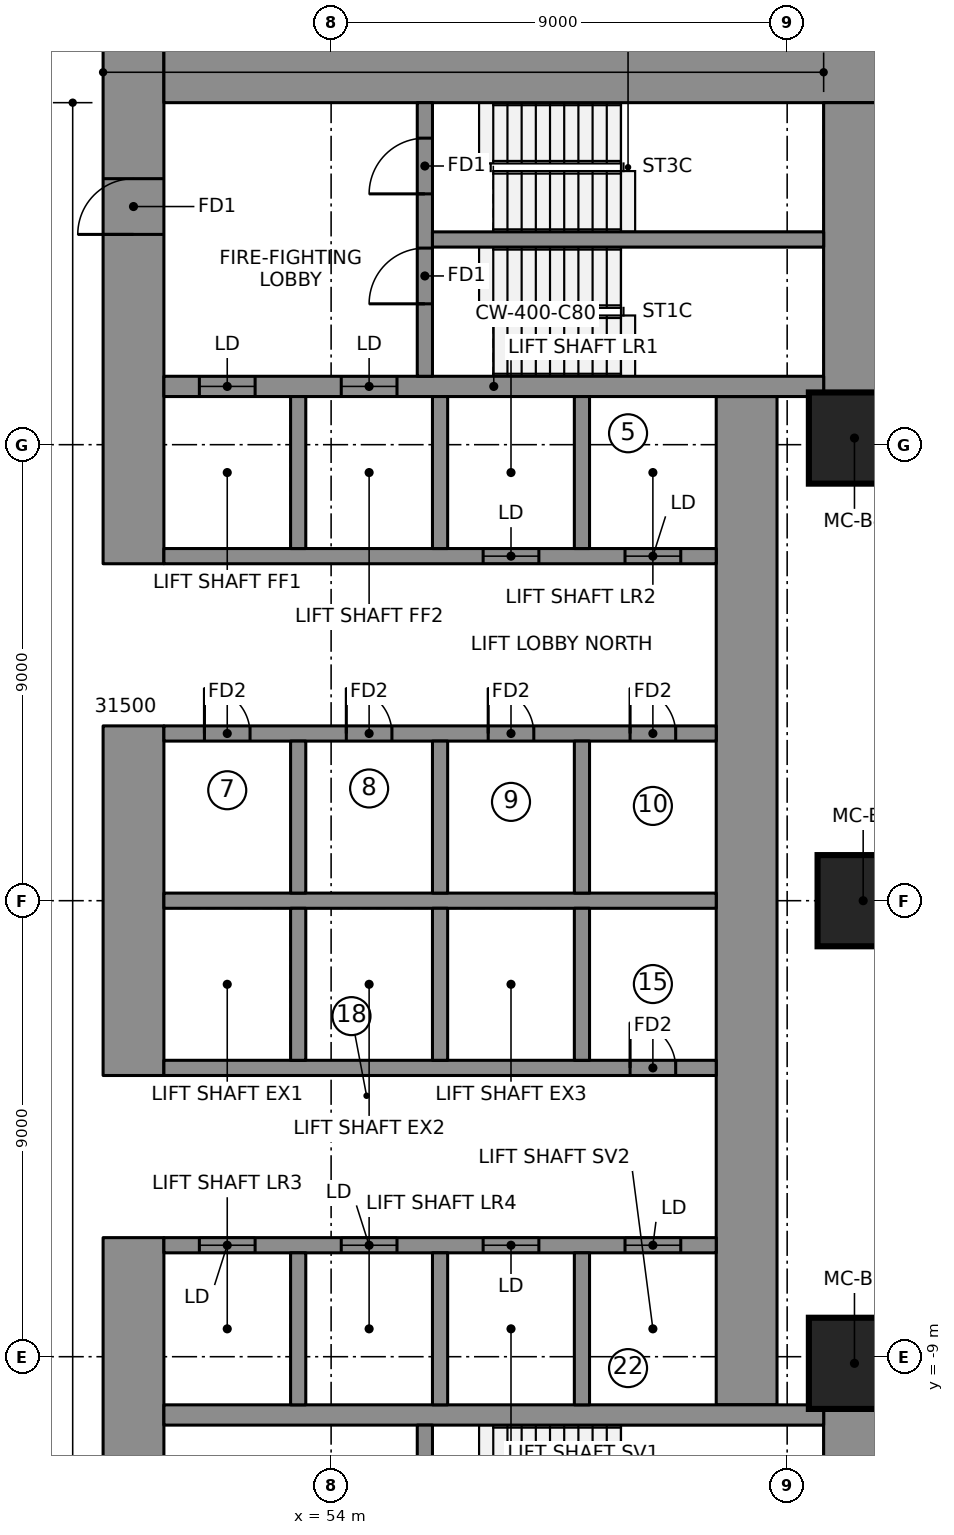
"""IFC4 building model, lengths in metres.
Left out: names, types, materials, properties, quantities, classifications, styles, units other than length and angle.
Written with IfcOpenShell. Run it as: python <this file> out.ifc"""

import sys

from ifc_helpers import new_model, si_unit, direction, frame, frame_2d, origin, origin_2d, place, context, subcontext, project, spatial, rectangle, extrude, element, fill, save


model = new_model("IFC4")
c1 = context("Model", 3, precision=1e-05, world=origin(), true_north=direction((0.0, 1.0)))
c2 = subcontext(c1, "Body", "Model", "MODEL_VIEW")
j1 = project(units=[si_unit("LENGTHUNIT", "METRE"), si_unit("PLANEANGLEUNIT", "RADIAN")], contexts=[c1])
p1 = place(None, origin())
s1 = spatial("IfcSite", under=j1, at=p1, CompositionType="ELEMENT")
p2 = place(p1, origin())
s2 = spatial("IfcBuilding", under=s1, at=p2, CompositionType="ELEMENT")
p3 = place(p2, frame((0.0, 0.0, 46.7)))
s3 = spatial("IfcBuildingStorey", under=s2, at=p3, CompositionType="ELEMENT", Elevation=46.7)
p4 = place(p3, frame((50.1, 6.65, 0.0), z_axis=(0.0, 0.0, 1.0), x_axis=(0.0, 1.0, 0.0)))
e1 = element("IfcWall", 1, at=p4, inside=s3, PredefinedType="SHEAR", context=c2, shape_type="SweptSolid", body=[
    extrude(rectangle(XDim=10.3, YDim=1.2, at=frame_2d((5.15, 0.0))), origin(), (0.0, 0.0, 1.0), 3.55),
])
p5 = place(p4, frame((6.5, 0.0, 0.0)))
e2 = element("IfcOpeningElement", 2, at=p5, cuts=e1, PredefinedType="OPENING", context=c2, shape_type="SweptSolid", body=[
    extrude(rectangle(XDim=1.1, YDim=2.1, at=frame_2d((0.55, 1.05))), frame((0.0, 0.61, 0.0), z_axis=(0.0, -1.0, 0.0), x_axis=(1.0, 0.0, 0.0)), (0.0, 0.0, 1.0), 1.22),
])
p6 = place(p3, frame((50.1, -3.45, 0.0), z_axis=(0.0, 0.0, 1.0), x_axis=(0.0, 1.0, 0.0)))
e3 = element("IfcWall", 3, at=p6, inside=s3, PredefinedType="SHEAR", context=c2, shape_type="SweptSolid", body=[
    extrude(rectangle(XDim=6.9, YDim=1.2, at=frame_2d((3.45, 0.0))), origin(), (0.0, 0.0, 1.0), 3.55),
])
p7 = place(p3, frame((50.1, -16.95, 0.0), z_axis=(0.0, 0.0, 1.0), x_axis=(0.0, 1.0, 0.0)))
e4 = element("IfcWall", 4, at=p7, inside=s3, PredefinedType="SHEAR", context=c2, shape_type="SweptSolid", body=[
    extrude(rectangle(XDim=10.3, YDim=1.2, at=frame_2d((5.15, 0.0))), origin(), (0.0, 0.0, 1.0), 3.55),
])
p8 = place(p7, frame((2.7, 0.0, 0.0)))
e5 = element("IfcOpeningElement", 5, at=p8, cuts=e4, PredefinedType="OPENING", context=c2, shape_type="SweptSolid", body=[
    extrude(rectangle(XDim=1.1, YDim=2.1, at=frame_2d((0.55, 1.05))), frame((0.0, 0.61, 0.0), z_axis=(0.0, -1.0, 0.0), x_axis=(1.0, 0.0, 0.0)), (0.0, 0.0, 1.0), 1.22),
])
p9 = place(p3, frame((50.7, 16.35, 0.0), z_axis=(0.0, 0.0, 1.0), x_axis=(1.0, 0.0, 0.0)))
e6 = element("IfcWall", 6, at=p9, inside=s3, PredefinedType="SHEAR", context=c2, shape_type="SweptSolid", body=[
    extrude(rectangle(XDim=14.22, YDim=1.2, at=frame_2d((7.11, 0.0))), origin(), (0.0, 0.0, 1.0), 3.55),
])
for number, where, z_axis, x_axis in (
    (7, (64.32, 9.95, 0.0), (0.0, 0.0, 1.0), (0.0, 1.0, 0.0)),
    (8, (64.32, -15.75, 0.0), (0.0, 0.0, 1.0), (0.0, 1.0, 0.0)),
):
    element("IfcWall", number, at=place(p3, frame(where, z_axis=z_axis, x_axis=x_axis)), inside=s3, PredefinedType="SHEAR", context=c2, shape_type="SweptSolid", body=[
        extrude(rectangle(XDim=5.8, YDim=1.2, at=frame_2d((2.9, 0.0))), origin(), (0.0, 0.0, 1.0), 3.55),
    ])
p10 = place(p3, frame((62.2, -9.95, 0.0), z_axis=(0.0, 0.0, 1.0), x_axis=(0.0, 1.0, 0.0)))
e9 = element("IfcWall", 9, at=p10, inside=s3, PredefinedType="SHEAR", context=c2, shape_type="SweptSolid", body=[
    extrude(rectangle(XDim=19.9, YDim=1.2, at=frame_2d((9.95, 0.0))), origin(), (0.0, 0.0, 1.0), 3.55),
])
p11 = place(p3, frame((50.7, 10.15, 0.0), z_axis=(0.0, 0.0, 1.0), x_axis=(1.0, 0.0, 0.0)))
e10 = element("IfcWall", 10, at=p11, inside=s3, PredefinedType="SHEAR", context=c2, shape_type="SweptSolid", body=[
    extrude(rectangle(XDim=13.02, YDim=0.4, at=frame_2d((6.51, 0.0))), origin(), (0.0, 0.0, 1.0), 3.55),
])
p12 = place(p11, frame((0.7, 0.0, 0.0)))
e11 = element("IfcOpeningElement", 11, at=p12, cuts=e10, PredefinedType="OPENING", context=c2, shape_type="SweptSolid", body=[
    extrude(rectangle(XDim=1.1, YDim=2.1, at=frame_2d((0.55, 1.05))), frame((0.0, 0.21, 0.0), z_axis=(0.0, -1.0, 0.0), x_axis=(1.0, 0.0, 0.0)), (0.0, 0.0, 1.0), 0.42),
])
p13 = place(p11, frame((3.5, 0.0, 0.0)))
e12 = element("IfcOpeningElement", 12, at=p13, cuts=e10, PredefinedType="OPENING", context=c2, shape_type="SweptSolid", body=[
    extrude(rectangle(XDim=1.1, YDim=2.1, at=frame_2d((0.55, 1.05))), frame((0.0, 0.21, 0.0), z_axis=(0.0, -1.0, 0.0), x_axis=(1.0, 0.0, 0.0)), (0.0, 0.0, 1.0), 0.42),
])
p14 = place(p3, frame((50.7, -10.15, 0.0), z_axis=(0.0, 0.0, 1.0), x_axis=(1.0, 0.0, 0.0)))
e13 = element("IfcWall", 13, at=p14, inside=s3, PredefinedType="SHEAR", context=c2, shape_type="SweptSolid", body=[
    extrude(rectangle(XDim=13.02, YDim=0.4, at=frame_2d((6.51, 0.0))), origin(), (0.0, 0.0, 1.0), 3.55),
])
p15 = place(p3, frame((50.7, 0.0, 0.0), z_axis=(0.0, 0.0, 1.0), x_axis=(1.0, 0.0, 0.0)))
e14 = element("IfcWall", 14, at=p15, inside=s3, PredefinedType="SHEAR", context=c2, shape_type="SweptSolid", body=[
    extrude(rectangle(XDim=10.9, YDim=0.3, at=frame_2d((5.45, 0.0))), origin(), (0.0, 0.0, 1.0), 3.55),
])
p16 = place(p3, frame((50.7, 3.3, 0.0), z_axis=(0.0, 0.0, 1.0), x_axis=(1.0, 0.0, 0.0)))
e15 = element("IfcWall", 15, at=p16, inside=s3, PredefinedType="SHEAR", context=c2, shape_type="SweptSolid", body=[
    extrude(rectangle(XDim=10.9, YDim=0.3, at=frame_2d((5.45, 0.0))), origin(), (0.0, 0.0, 1.0), 3.55),
])
p17 = place(p16, frame((0.8, 0.0, 0.0)))
e16 = element("IfcOpeningElement", 16, at=p17, cuts=e15, PredefinedType="OPENING", context=c2, shape_type="SweptSolid", body=[
    extrude(rectangle(XDim=0.9, YDim=2.1, at=frame_2d((0.45, 1.05))), frame((0.0, 0.16, 0.0), z_axis=(0.0, -1.0, 0.0), x_axis=(1.0, 0.0, 0.0)), (0.0, 0.0, 1.0), 0.32),
])
p18 = place(p16, frame((3.6, 0.0, 0.0)))
e17 = element("IfcOpeningElement", 17, at=p18, cuts=e15, PredefinedType="OPENING", context=c2, shape_type="SweptSolid", body=[
    extrude(rectangle(XDim=0.9, YDim=2.1, at=frame_2d((0.45, 1.05))), frame((0.0, 0.16, 0.0), z_axis=(0.0, -1.0, 0.0), x_axis=(1.0, 0.0, 0.0)), (0.0, 0.0, 1.0), 0.32),
])
p19 = place(p16, frame((6.4, 0.0, 0.0)))
e18 = element("IfcOpeningElement", 18, at=p19, cuts=e15, PredefinedType="OPENING", context=c2, shape_type="SweptSolid", body=[
    extrude(rectangle(XDim=0.9, YDim=2.1, at=frame_2d((0.45, 1.05))), frame((0.0, 0.16, 0.0), z_axis=(0.0, -1.0, 0.0), x_axis=(1.0, 0.0, 0.0)), (0.0, 0.0, 1.0), 0.32),
])
p20 = place(p16, frame((9.2, 0.0, 0.0)))
e19 = element("IfcOpeningElement", 19, at=p20, cuts=e15, PredefinedType="OPENING", context=c2, shape_type="SweptSolid", body=[
    extrude(rectangle(XDim=0.9, YDim=2.1, at=frame_2d((0.45, 1.05))), frame((0.0, 0.16, 0.0), z_axis=(0.0, -1.0, 0.0), x_axis=(1.0, 0.0, 0.0)), (0.0, 0.0, 1.0), 0.32),
])
p21 = place(p3, frame((50.7, 6.8, 0.0), z_axis=(0.0, 0.0, 1.0), x_axis=(1.0, 0.0, 0.0)))
e20 = element("IfcWall", 20, at=p21, inside=s3, PredefinedType="SHEAR", context=c2, shape_type="SweptSolid", body=[
    extrude(rectangle(XDim=10.9, YDim=0.3, at=frame_2d((5.45, 0.0))), origin(), (0.0, 0.0, 1.0), 3.55),
])
p22 = place(p21, frame((6.3, 0.0, 0.0)))
e21 = element("IfcOpeningElement", 21, at=p22, cuts=e20, PredefinedType="OPENING", context=c2, shape_type="SweptSolid", body=[
    extrude(rectangle(XDim=1.1, YDim=2.1, at=frame_2d((0.55, 1.05))), frame((0.0, 0.16, 0.0), z_axis=(0.0, -1.0, 0.0), x_axis=(1.0, 0.0, 0.0)), (0.0, 0.0, 1.0), 0.32),
])
p23 = place(p21, frame((9.1, 0.0, 0.0)))
e22 = element("IfcOpeningElement", 22, at=p23, cuts=e20, PredefinedType="OPENING", context=c2, shape_type="SweptSolid", body=[
    extrude(rectangle(XDim=1.1, YDim=2.1, at=frame_2d((0.55, 1.05))), frame((0.0, 0.16, 0.0), z_axis=(0.0, -1.0, 0.0), x_axis=(1.0, 0.0, 0.0)), (0.0, 0.0, 1.0), 0.32),
])
for number, where, z_axis, x_axis in (
    (23, (53.35, 0.15, 0.0), (0.0, 0.0, 1.0), (0.0, 1.0, 0.0)),
    (24, (53.35, 6.95, 0.0), (0.0, 0.0, 1.0), (0.0, 1.0, 0.0)),
    (25, (56.15, 0.15, 0.0), (0.0, 0.0, 1.0), (0.0, 1.0, 0.0)),
    (26, (56.15, 6.95, 0.0), (0.0, 0.0, 1.0), (0.0, 1.0, 0.0)),
    (27, (58.95, 0.15, 0.0), (0.0, 0.0, 1.0), (0.0, 1.0, 0.0)),
    (28, (58.95, 6.95, 0.0), (0.0, 0.0, 1.0), (0.0, 1.0, 0.0)),
):
    element("IfcWall", number, at=place(p3, frame(where, z_axis=z_axis, x_axis=x_axis)), inside=s3, PredefinedType="SHEAR", context=c2, shape_type="SweptSolid", body=[
        extrude(rectangle(XDim=3.0, YDim=0.3, at=frame_2d((1.5, 0.0))), origin(), (0.0, 0.0, 1.0), 3.55),
    ])
p24 = place(p3, frame((50.7, -3.3, 0.0), z_axis=(0.0, 0.0, 1.0), x_axis=(1.0, 0.0, 0.0)))
e29 = element("IfcWall", 29, at=p24, inside=s3, PredefinedType="SHEAR", context=c2, shape_type="SweptSolid", body=[
    extrude(rectangle(XDim=10.9, YDim=0.3, at=frame_2d((5.45, 0.0))), origin(), (0.0, 0.0, 1.0), 3.55),
])
p25 = place(p24, frame((9.2, 0.0, 0.0)))
e30 = element("IfcOpeningElement", 30, at=p25, cuts=e29, PredefinedType="OPENING", context=c2, shape_type="SweptSolid", body=[
    extrude(rectangle(XDim=0.9, YDim=2.1, at=frame_2d((0.45, 1.05))), frame((0.0, 0.16, 0.0), z_axis=(0.0, -1.0, 0.0), x_axis=(1.0, 0.0, 0.0)), (0.0, 0.0, 1.0), 0.32),
])
p26 = place(p3, frame((50.7, -6.8, 0.0), z_axis=(0.0, 0.0, 1.0), x_axis=(1.0, 0.0, 0.0)))
e31 = element("IfcWall", 31, at=p26, inside=s3, PredefinedType="SHEAR", context=c2, shape_type="SweptSolid", body=[
    extrude(rectangle(XDim=10.9, YDim=0.3, at=frame_2d((5.45, 0.0))), origin(), (0.0, 0.0, 1.0), 3.55),
])
p27 = place(p26, frame((0.7, 0.0, 0.0)))
e32 = element("IfcOpeningElement", 32, at=p27, cuts=e31, PredefinedType="OPENING", context=c2, shape_type="SweptSolid", body=[
    extrude(rectangle(XDim=1.1, YDim=2.1, at=frame_2d((0.55, 1.05))), frame((0.0, 0.16, 0.0), z_axis=(0.0, -1.0, 0.0), x_axis=(1.0, 0.0, 0.0)), (0.0, 0.0, 1.0), 0.32),
])
p28 = place(p26, frame((3.5, 0.0, 0.0)))
e33 = element("IfcOpeningElement", 33, at=p28, cuts=e31, PredefinedType="OPENING", context=c2, shape_type="SweptSolid", body=[
    extrude(rectangle(XDim=1.1, YDim=2.1, at=frame_2d((0.55, 1.05))), frame((0.0, 0.16, 0.0), z_axis=(0.0, -1.0, 0.0), x_axis=(1.0, 0.0, 0.0)), (0.0, 0.0, 1.0), 0.32),
])
p29 = place(p26, frame((6.3, 0.0, 0.0)))
e34 = element("IfcOpeningElement", 34, at=p29, cuts=e31, PredefinedType="OPENING", context=c2, shape_type="SweptSolid", body=[
    extrude(rectangle(XDim=1.1, YDim=2.1, at=frame_2d((0.55, 1.05))), frame((0.0, 0.16, 0.0), z_axis=(0.0, -1.0, 0.0), x_axis=(1.0, 0.0, 0.0)), (0.0, 0.0, 1.0), 0.32),
])
p30 = place(p26, frame((9.1, 0.0, 0.0)))
e35 = element("IfcOpeningElement", 35, at=p30, cuts=e31, PredefinedType="OPENING", context=c2, shape_type="SweptSolid", body=[
    extrude(rectangle(XDim=1.1, YDim=2.1, at=frame_2d((0.55, 1.05))), frame((0.0, 0.16, 0.0), z_axis=(0.0, -1.0, 0.0), x_axis=(1.0, 0.0, 0.0)), (0.0, 0.0, 1.0), 0.32),
])
for number, where, z_axis, x_axis in (
    (36, (53.35, -3.15, 0.0), (0.0, 0.0, 1.0), (0.0, 1.0, 0.0)),
    (37, (53.35, -9.95, 0.0), (0.0, 0.0, 1.0), (0.0, 1.0, 0.0)),
    (38, (56.15, -3.15, 0.0), (0.0, 0.0, 1.0), (0.0, 1.0, 0.0)),
    (39, (56.15, -9.95, 0.0), (0.0, 0.0, 1.0), (0.0, 1.0, 0.0)),
    (40, (58.95, -3.15, 0.0), (0.0, 0.0, 1.0), (0.0, 1.0, 0.0)),
    (41, (58.95, -9.95, 0.0), (0.0, 0.0, 1.0), (0.0, 1.0, 0.0)),
):
    element("IfcWall", number, at=place(p3, frame(where, z_axis=z_axis, x_axis=x_axis)), inside=s3, PredefinedType="SHEAR", context=c2, shape_type="SweptSolid", body=[
        extrude(rectangle(XDim=3.0, YDim=0.3, at=frame_2d((1.5, 0.0))), origin(), (0.0, 0.0, 1.0), 3.55),
    ])
p31 = place(p3, frame((55.85, 10.35, 0.0), z_axis=(0.0, 0.0, 1.0), x_axis=(0.0, 1.0, 0.0)))
e42 = element("IfcWall", 42, at=p31, inside=s3, PredefinedType="SHEAR", context=c2, shape_type="SweptSolid", body=[
    extrude(rectangle(XDim=5.4, YDim=0.3, at=frame_2d((2.7, 0.0))), origin(), (0.0, 0.0, 1.0), 3.55),
])
p32 = place(p31, frame((1.43, 0.0, 0.0)))
e43 = element("IfcOpeningElement", 43, at=p32, cuts=e42, PredefinedType="OPENING", context=c2, shape_type="SweptSolid", body=[
    extrude(rectangle(XDim=1.1, YDim=2.1, at=frame_2d((0.55, 1.05))), frame((0.0, 0.16, 0.0), z_axis=(0.0, -1.0, 0.0), x_axis=(1.0, 0.0, 0.0)), (0.0, 0.0, 1.0), 0.32),
])
p33 = place(p31, frame((3.6, 0.0, 0.0)))
e44 = element("IfcOpeningElement", 44, at=p33, cuts=e42, PredefinedType="OPENING", context=c2, shape_type="SweptSolid", body=[
    extrude(rectangle(XDim=1.1, YDim=2.1, at=frame_2d((0.55, 1.05))), frame((0.0, 0.16, 0.0), z_axis=(0.0, -1.0, 0.0), x_axis=(1.0, 0.0, 0.0)), (0.0, 0.0, 1.0), 0.32),
])
p34 = place(p3, frame((55.85, -15.75, 0.0), z_axis=(0.0, 0.0, 1.0), x_axis=(0.0, 1.0, 0.0)))
e45 = element("IfcWall", 45, at=p34, inside=s3, PredefinedType="SHEAR", context=c2, shape_type="SweptSolid", body=[
    extrude(rectangle(XDim=5.4, YDim=0.3, at=frame_2d((2.7, 0.0))), origin(), (0.0, 0.0, 1.0), 3.55),
])
p35 = place(p34, frame((3.6, 0.0, 0.0)))
e46 = element("IfcOpeningElement", 46, at=p35, cuts=e45, PredefinedType="OPENING", context=c2, shape_type="SweptSolid", body=[
    extrude(rectangle(XDim=1.1, YDim=2.1, at=frame_2d((0.55, 1.05))), frame((0.0, 0.16, 0.0), z_axis=(0.0, -1.0, 0.0), x_axis=(1.0, 0.0, 0.0)), (0.0, 0.0, 1.0), 0.32),
])
p36 = place(p34, frame((0.8, 0.0, 0.0)))
e47 = element("IfcOpeningElement", 47, at=p36, cuts=e45, PredefinedType="OPENING", context=c2, shape_type="SweptSolid", body=[
    extrude(rectangle(XDim=0.9, YDim=2.1, at=frame_2d((0.45, 1.05))), frame((0.0, 0.16, 0.0), z_axis=(0.0, -1.0, 0.0), x_axis=(1.0, 0.0, 0.0)), (0.0, 0.0, 1.0), 0.32),
])
p37 = place(p3, frame((56.0, 13.05, 0.0), z_axis=(0.0, 0.0, 1.0), x_axis=(1.0, 0.0, 0.0)))
e48 = element("IfcWall", 48, at=p37, inside=s3, PredefinedType="SHEAR", context=c2, shape_type="SweptSolid", body=[
    extrude(rectangle(XDim=7.72, YDim=0.3, at=frame_2d((3.86, 0.0))), origin(), (0.0, 0.0, 1.0), 3.55),
])
for number, where, z_axis, x_axis in (
    (49, (64.328, -9.131, 0.0), (0.0, 0.0, 1.0), (1.0, 0.0, 0.0)),
    (50, (64.5, 0.0, 0.0), (0.0, 0.0, 1.0), (1.0, 0.0, 0.0)),
    (51, (64.328, 9.131, 0.0), (0.0, 0.0, 1.0), (1.0, 0.0, 0.0)),
):
    element("IfcColumn", number, at=place(p3, frame(where, z_axis=z_axis, x_axis=x_axis)), inside=s3, PredefinedType="COLUMN", context=c2, shape_type="SweptSolid", body=[
        extrude(rectangle(XDim=1.8, YDim=1.8, at=origin_2d()), origin(), (0.0, 0.0, 1.0), 3.55),
    ])
p38 = place(p12, origin())
e52 = element("IfcDoor", 52, at=p38, inside=s3, OperationType="DOUBLE_DOOR_SLIDING", PredefinedType="DOOR", context=c2, shape_type="SweptSolid", body=[
    extrude(rectangle(XDim=1.1, YDim=2.1, at=frame_2d((0.55, 1.05))), frame((0.0, 0.025, 0.0), z_axis=(0.0, -1.0, 0.0), x_axis=(1.0, 0.0, 0.0)), (0.0, 0.0, 1.0), 0.05),
])
fill(e11, e52)
p39 = place(p13, origin())
e53 = element("IfcDoor", 53, at=p39, inside=s3, OperationType="DOUBLE_DOOR_SLIDING", PredefinedType="DOOR", context=c2, shape_type="SweptSolid", body=[
    extrude(rectangle(XDim=1.1, YDim=2.1, at=frame_2d((0.55, 1.05))), frame((0.0, 0.025, 0.0), z_axis=(0.0, -1.0, 0.0), x_axis=(1.0, 0.0, 0.0)), (0.0, 0.0, 1.0), 0.05),
])
fill(e12, e53)
p40 = place(p22, origin())
e54 = element("IfcDoor", 54, at=p40, inside=s3, OperationType="DOUBLE_DOOR_SLIDING", PredefinedType="DOOR", context=c2, shape_type="SweptSolid", body=[
    extrude(rectangle(XDim=1.1, YDim=2.1, at=frame_2d((0.55, 1.05))), frame((0.0, 0.025, 0.0), z_axis=(0.0, -1.0, 0.0), x_axis=(1.0, 0.0, 0.0)), (0.0, 0.0, 1.0), 0.05),
])
fill(e21, e54)
p41 = place(p23, origin())
e55 = element("IfcDoor", 55, at=p41, inside=s3, OperationType="DOUBLE_DOOR_SLIDING", PredefinedType="DOOR", context=c2, shape_type="SweptSolid", body=[
    extrude(rectangle(XDim=1.1, YDim=2.1, at=frame_2d((0.55, 1.05))), frame((0.0, 0.025, 0.0), z_axis=(0.0, -1.0, 0.0), x_axis=(1.0, 0.0, 0.0)), (0.0, 0.0, 1.0), 0.05),
])
fill(e22, e55)
p42 = place(p27, origin())
e56 = element("IfcDoor", 56, at=p42, inside=s3, OperationType="DOUBLE_DOOR_SLIDING", PredefinedType="DOOR", context=c2, shape_type="SweptSolid", body=[
    extrude(rectangle(XDim=1.1, YDim=2.1, at=frame_2d((0.55, 1.05))), frame((0.0, 0.025, 0.0), z_axis=(0.0, -1.0, 0.0), x_axis=(1.0, 0.0, 0.0)), (0.0, 0.0, 1.0), 0.05),
])
fill(e32, e56)
p43 = place(p28, origin())
e57 = element("IfcDoor", 57, at=p43, inside=s3, OperationType="DOUBLE_DOOR_SLIDING", PredefinedType="DOOR", context=c2, shape_type="SweptSolid", body=[
    extrude(rectangle(XDim=1.1, YDim=2.1, at=frame_2d((0.55, 1.05))), frame((0.0, 0.025, 0.0), z_axis=(0.0, -1.0, 0.0), x_axis=(1.0, 0.0, 0.0)), (0.0, 0.0, 1.0), 0.05),
])
fill(e33, e57)
p44 = place(p29, origin())
e58 = element("IfcDoor", 58, at=p44, inside=s3, OperationType="DOUBLE_DOOR_SLIDING", PredefinedType="DOOR", context=c2, shape_type="SweptSolid", body=[
    extrude(rectangle(XDim=1.1, YDim=2.1, at=frame_2d((0.55, 1.05))), frame((0.0, 0.025, 0.0), z_axis=(0.0, -1.0, 0.0), x_axis=(1.0, 0.0, 0.0)), (0.0, 0.0, 1.0), 0.05),
])
fill(e34, e58)
p45 = place(p30, origin())
e59 = element("IfcDoor", 59, at=p45, inside=s3, OperationType="DOUBLE_DOOR_SLIDING", PredefinedType="DOOR", context=c2, shape_type="SweptSolid", body=[
    extrude(rectangle(XDim=1.1, YDim=2.1, at=frame_2d((0.55, 1.05))), frame((0.0, 0.025, 0.0), z_axis=(0.0, -1.0, 0.0), x_axis=(1.0, 0.0, 0.0)), (0.0, 0.0, 1.0), 0.05),
])
fill(e35, e59)
p46 = place(p32, origin())
e60 = element("IfcDoor", 60, at=p46, inside=s3, OperationType="SINGLE_SWING_RIGHT", PredefinedType="DOOR", context=c2, shape_type="SweptSolid", body=[
    extrude(rectangle(XDim=1.1, YDim=2.1, at=frame_2d((0.55, 1.05))), frame((0.0, 0.025, 0.0), z_axis=(0.0, -1.0, 0.0), x_axis=(1.0, 0.0, 0.0)), (0.0, 0.0, 1.0), 0.05),
])
fill(e43, e60)
p47 = place(p33, origin())
e61 = element("IfcDoor", 61, at=p47, inside=s3, OperationType="SINGLE_SWING_RIGHT", PredefinedType="DOOR", context=c2, shape_type="SweptSolid", body=[
    extrude(rectangle(XDim=1.1, YDim=2.1, at=frame_2d((0.55, 1.05))), frame((0.0, 0.025, 0.0), z_axis=(0.0, -1.0, 0.0), x_axis=(1.0, 0.0, 0.0)), (0.0, 0.0, 1.0), 0.05),
])
fill(e44, e61)
p48 = place(p5, origin())
e62 = element("IfcDoor", 62, at=p48, inside=s3, OperationType="SINGLE_SWING_RIGHT", PredefinedType="DOOR", context=c2, shape_type="SweptSolid", body=[
    extrude(rectangle(XDim=1.1, YDim=2.1, at=frame_2d((0.55, 1.05))), frame((0.0, 0.025, 0.0), z_axis=(0.0, -1.0, 0.0), x_axis=(1.0, 0.0, 0.0)), (0.0, 0.0, 1.0), 0.05),
])
fill(e2, e62)
p49 = place(p17, origin())
e63 = element("IfcDoor", 63, at=p49, inside=s3, OperationType="SINGLE_SWING_LEFT", PredefinedType="DOOR", context=c2, shape_type="SweptSolid", body=[
    extrude(rectangle(XDim=0.9, YDim=2.1, at=frame_2d((0.45, 1.05))), frame((0.0, 0.025, 0.0), z_axis=(0.0, -1.0, 0.0), x_axis=(1.0, 0.0, 0.0)), (0.0, 0.0, 1.0), 0.05),
])
fill(e16, e63)
p50 = place(p18, origin())
e64 = element("IfcDoor", 64, at=p50, inside=s3, OperationType="SINGLE_SWING_LEFT", PredefinedType="DOOR", context=c2, shape_type="SweptSolid", body=[
    extrude(rectangle(XDim=0.9, YDim=2.1, at=frame_2d((0.45, 1.05))), frame((0.0, 0.025, 0.0), z_axis=(0.0, -1.0, 0.0), x_axis=(1.0, 0.0, 0.0)), (0.0, 0.0, 1.0), 0.05),
])
fill(e17, e64)
p51 = place(p19, origin())
e65 = element("IfcDoor", 65, at=p51, inside=s3, OperationType="SINGLE_SWING_LEFT", PredefinedType="DOOR", context=c2, shape_type="SweptSolid", body=[
    extrude(rectangle(XDim=0.9, YDim=2.1, at=frame_2d((0.45, 1.05))), frame((0.0, 0.025, 0.0), z_axis=(0.0, -1.0, 0.0), x_axis=(1.0, 0.0, 0.0)), (0.0, 0.0, 1.0), 0.05),
])
fill(e18, e65)
p52 = place(p20, origin())
e66 = element("IfcDoor", 66, at=p52, inside=s3, OperationType="SINGLE_SWING_LEFT", PredefinedType="DOOR", context=c2, shape_type="SweptSolid", body=[
    extrude(rectangle(XDim=0.9, YDim=2.1, at=frame_2d((0.45, 1.05))), frame((0.0, 0.025, 0.0), z_axis=(0.0, -1.0, 0.0), x_axis=(1.0, 0.0, 0.0)), (0.0, 0.0, 1.0), 0.05),
])
fill(e19, e66)
p53 = place(p25, origin())
e67 = element("IfcDoor", 67, at=p53, inside=s3, OperationType="SINGLE_SWING_LEFT", PredefinedType="DOOR", context=c2, shape_type="SweptSolid", body=[
    extrude(rectangle(XDim=0.9, YDim=2.1, at=frame_2d((0.45, 1.05))), frame((0.0, 0.025, 0.0), z_axis=(0.0, -1.0, 0.0), x_axis=(1.0, 0.0, 0.0)), (0.0, 0.0, 1.0), 0.05),
])
fill(e30, e67)
save(model, sys.argv[1])
